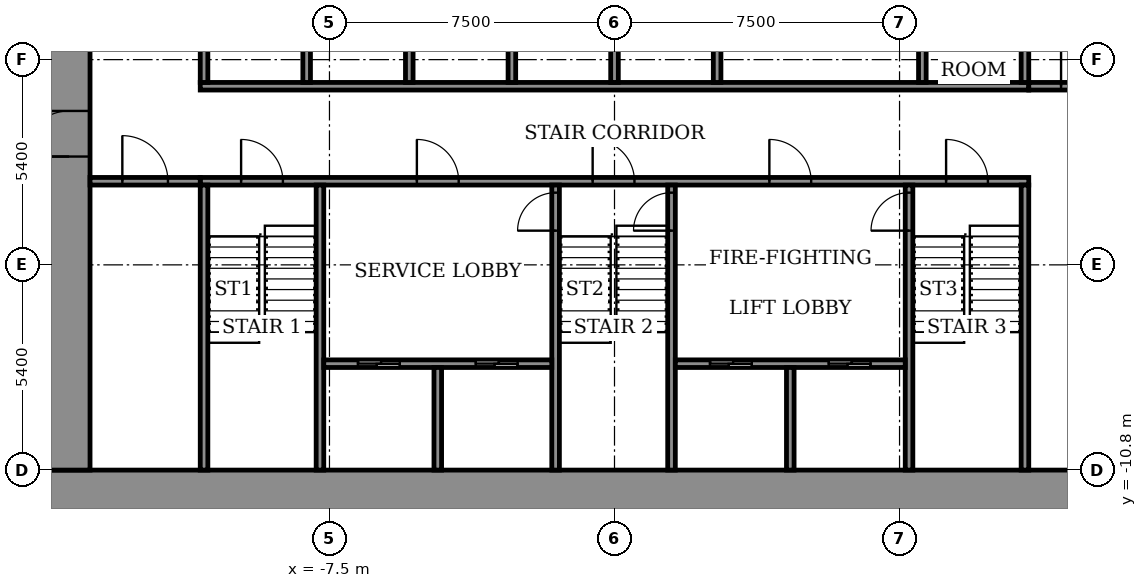
"""IFC4 building model, lengths in metres.
Left out: names, types, materials, properties, quantities, classifications, styles, units other than length and angle.
Written with IfcOpenShell. Run it as: python <this file> out.ifc"""

import sys

from ifc_helpers import new_model, si_unit, direction, frame, frame_2d, origin, place, context, subcontext, project, spatial, rectangle, extrude, element, fill, save


model = new_model("IFC4")
c1 = context("Model", 3, precision=1e-05, world=origin(), true_north=direction((0.0, 1.0)))
c2 = subcontext(c1, "Body", "Model", "MODEL_VIEW")
j1 = project(units=[si_unit("LENGTHUNIT", "METRE"), si_unit("PLANEANGLEUNIT", "RADIAN")], contexts=[c1])
p1 = place(None, origin())
s1 = spatial("IfcSite", under=j1, at=p1, CompositionType="ELEMENT")
p2 = place(p1, origin())
s2 = spatial("IfcBuilding", under=s1, at=p2, CompositionType="ELEMENT")
p3 = place(p2, frame((0.0, 0.0, 67.5)))
s3 = spatial("IfcBuildingStorey", under=s2, at=p3, CompositionType="ELEMENT", Elevation=67.5)
p4 = place(p3, frame((-14.9, -11.35, 0.0), z_axis=(0.0, 0.0, 1.0), x_axis=(1.0, 0.0, 0.0)))
e1 = element("IfcWall", 1, at=p4, inside=s3, PredefinedType="SHEAR", context=c2, shape_type="SweptSolid", body=[
    extrude(rectangle(XDim=29.8, YDim=1.1, at=frame_2d((14.9, 0.0))), origin(), (0.0, 0.0, 1.0), 3.6),
])
p5 = place(p3, frame((-14.35, -10.8, 0.0), z_axis=(0.0, 0.0, 1.0), x_axis=(0.0, 1.0, 0.0)))
e2 = element("IfcWall", 2, at=p5, inside=s3, PredefinedType="SHEAR", context=c2, shape_type="SweptSolid", body=[
    extrude(rectangle(XDim=21.6, YDim=1.1, at=frame_2d((10.8, 0.0))), origin(), (0.0, 0.0, 1.0), 3.6),
])
p6 = place(p5, frame((8.25, 0.0, 0.0)))
e3 = element("IfcOpeningElement", 3, at=p6, cuts=e2, PredefinedType="OPENING", context=c2, shape_type="SweptSolid", body=[
    extrude(rectangle(XDim=1.2, YDim=2.1, at=frame_2d((0.6, 1.05))), frame((0.0, 0.56, 0.0), z_axis=(0.0, -1.0, 0.0), x_axis=(1.0, 0.0, 0.0)), (0.0, 0.0, 1.0), 1.12),
])
p7 = place(p5, frame((15.25, 0.0, 0.0)))
e4 = element("IfcOpeningElement", 4, at=p7, cuts=e2, PredefinedType="OPENING", context=c2, shape_type="SweptSolid", body=[
    extrude(rectangle(XDim=1.2, YDim=2.1, at=frame_2d((0.6, 1.05))), frame((0.0, 0.56, 0.0), z_axis=(0.0, -1.0, 0.0), x_axis=(1.0, 0.0, 0.0)), (0.0, 0.0, 1.0), 1.12),
])
p8 = place(p3, frame((-10.9, -3.2, 0.0), z_axis=(0.0, 0.0, 1.0), x_axis=(1.0, 0.0, 0.0)))
e5 = element("IfcWall", 5, at=p8, inside=s3, PredefinedType="SHEAR", context=c2, shape_type="SweptSolid", body=[
    extrude(rectangle(XDim=21.8, YDim=0.2, at=frame_2d((10.9, 0.0))), origin(), (0.0, 0.0, 1.0), 3.05),
])
p9 = place(p8, frame((1.075, 0.0, 0.0)))
e6 = element("IfcOpeningElement", 6, at=p9, cuts=e5, PredefinedType="OPENING", context=c2, shape_type="SweptSolid", body=[
    extrude(rectangle(XDim=1.1, YDim=2.1, at=frame_2d((0.55, 1.05))), frame((0.0, 0.11, 0.0), z_axis=(0.0, -1.0, 0.0), x_axis=(1.0, 0.0, 0.0)), (0.0, 0.0, 1.0), 0.22),
])
p10 = place(p8, frame((10.325, 0.0, 0.0)))
e7 = element("IfcOpeningElement", 7, at=p10, cuts=e5, PredefinedType="OPENING", context=c2, shape_type="SweptSolid", body=[
    extrude(rectangle(XDim=1.1, YDim=2.1, at=frame_2d((0.55, 1.05))), frame((0.0, 0.11, 0.0), z_axis=(0.0, -1.0, 0.0), x_axis=(1.0, 0.0, 0.0)), (0.0, 0.0, 1.0), 0.22),
])
p11 = place(p8, frame((19.625, 0.0, 0.0)))
e8 = element("IfcOpeningElement", 8, at=p11, cuts=e5, PredefinedType="OPENING", context=c2, shape_type="SweptSolid", body=[
    extrude(rectangle(XDim=1.1, YDim=2.1, at=frame_2d((0.55, 1.05))), frame((0.0, 0.11, 0.0), z_axis=(0.0, -1.0, 0.0), x_axis=(1.0, 0.0, 0.0)), (0.0, 0.0, 1.0), 0.22),
])
p12 = place(p8, frame((5.7, 0.0, 0.0)))
e9 = element("IfcOpeningElement", 9, at=p12, cuts=e5, PredefinedType="OPENING", context=c2, shape_type="SweptSolid", body=[
    extrude(rectangle(XDim=1.1, YDim=2.1, at=frame_2d((0.55, 1.05))), frame((0.0, 0.11, 0.0), z_axis=(0.0, -1.0, 0.0), x_axis=(1.0, 0.0, 0.0)), (0.0, 0.0, 1.0), 0.22),
])
p13 = place(p8, frame((14.975, 0.0, 0.0)))
e10 = element("IfcOpeningElement", 10, at=p13, cuts=e5, PredefinedType="OPENING", context=c2, shape_type="SweptSolid", body=[
    extrude(rectangle(XDim=1.1, YDim=2.1, at=frame_2d((0.55, 1.05))), frame((0.0, 0.11, 0.0), z_axis=(0.0, -1.0, 0.0), x_axis=(1.0, 0.0, 0.0)), (0.0, 0.0, 1.0), 0.22),
])
p14 = place(p3, frame((-10.9, -0.7, 0.0), z_axis=(0.0, 0.0, 1.0), x_axis=(1.0, 0.0, 0.0)))
e11 = element("IfcWall", 11, at=p14, inside=s3, PredefinedType="SHEAR", context=c2, shape_type="SweptSolid", body=[
    extrude(rectangle(XDim=21.8, YDim=0.2, at=frame_2d((10.9, 0.0))), origin(), (0.0, 0.0, 1.0), 3.05),
])
for number, where, z_axis, x_axis in (
    (12, (-10.8, -10.8, 0.0), (0.0, 0.0, 1.0), (0.0, 1.0, 0.0)),
    (13, (-7.75, -10.8, 0.0), (0.0, 0.0, 1.0), (0.0, 1.0, 0.0)),
):
    element("IfcWall", number, at=place(p3, frame(where, z_axis=z_axis, x_axis=x_axis)), inside=s3, PredefinedType="SHEAR", context=c2, shape_type="SweptSolid", body=[
        extrude(rectangle(XDim=7.5, YDim=0.2, at=frame_2d((3.75, 0.0))), origin(), (0.0, 0.0, 1.0), 3.05),
    ])
p15 = place(p3, frame((-1.55, -10.8, 0.0), z_axis=(0.0, 0.0, 1.0), x_axis=(0.0, 1.0, 0.0)))
e14 = element("IfcWall", 14, at=p15, inside=s3, PredefinedType="SHEAR", context=c2, shape_type="SweptSolid", body=[
    extrude(rectangle(XDim=7.5, YDim=0.2, at=frame_2d((3.75, 0.0))), origin(), (0.0, 0.0, 1.0), 3.05),
])
p16 = place(p15, frame((6.3, 0.0, 0.0)))
e15 = element("IfcOpeningElement", 15, at=p16, cuts=e14, PredefinedType="OPENING", context=c2, shape_type="SweptSolid", body=[
    extrude(rectangle(XDim=1.0, YDim=2.1, at=frame_2d((0.5, 1.05))), frame((0.0, 0.11, 0.0), z_axis=(0.0, -1.0, 0.0), x_axis=(1.0, 0.0, 0.0)), (0.0, 0.0, 1.0), 0.22),
])
p17 = place(p3, frame((1.5, -10.8, 0.0), z_axis=(0.0, 0.0, 1.0), x_axis=(0.0, 1.0, 0.0)))
e16 = element("IfcWall", 16, at=p17, inside=s3, PredefinedType="SHEAR", context=c2, shape_type="SweptSolid", body=[
    extrude(rectangle(XDim=7.5, YDim=0.2, at=frame_2d((3.75, 0.0))), origin(), (0.0, 0.0, 1.0), 3.05),
])
p18 = place(p17, frame((6.3, 0.0, 0.0)))
e17 = element("IfcOpeningElement", 17, at=p18, cuts=e16, PredefinedType="OPENING", context=c2, shape_type="SweptSolid", body=[
    extrude(rectangle(XDim=1.0, YDim=2.1, at=frame_2d((0.5, 1.05))), frame((0.0, 0.11, 0.0), z_axis=(0.0, -1.0, 0.0), x_axis=(1.0, 0.0, 0.0)), (0.0, 0.0, 1.0), 0.22),
])
p19 = place(p3, frame((7.75, -10.8, 0.0), z_axis=(0.0, 0.0, 1.0), x_axis=(0.0, 1.0, 0.0)))
e18 = element("IfcWall", 18, at=p19, inside=s3, PredefinedType="SHEAR", context=c2, shape_type="SweptSolid", body=[
    extrude(rectangle(XDim=7.5, YDim=0.2, at=frame_2d((3.75, 0.0))), origin(), (0.0, 0.0, 1.0), 3.05),
])
p20 = place(p19, frame((6.3, 0.0, 0.0)))
e19 = element("IfcOpeningElement", 19, at=p20, cuts=e18, PredefinedType="OPENING", context=c2, shape_type="SweptSolid", body=[
    extrude(rectangle(XDim=1.0, YDim=2.1, at=frame_2d((0.5, 1.05))), frame((0.0, 0.11, 0.0), z_axis=(0.0, -1.0, 0.0), x_axis=(1.0, 0.0, 0.0)), (0.0, 0.0, 1.0), 0.22),
])
p21 = place(p3, frame((10.8, -10.8, 0.0), z_axis=(0.0, 0.0, 1.0), x_axis=(0.0, 1.0, 0.0)))
e20 = element("IfcWall", 20, at=p21, inside=s3, PredefinedType="SHEAR", context=c2, shape_type="SweptSolid", body=[
    extrude(rectangle(XDim=7.5, YDim=0.2, at=frame_2d((3.75, 0.0))), origin(), (0.0, 0.0, 1.0), 3.05),
])
p22 = place(p3, frame((-7.65, -8.0, 0.0), z_axis=(0.0, 0.0, 1.0), x_axis=(1.0, 0.0, 0.0)))
e21 = element("IfcWall", 21, at=p22, inside=s3, PredefinedType="SHEAR", context=c2, shape_type="SweptSolid", body=[
    extrude(rectangle(XDim=6.0, YDim=0.2, at=frame_2d((3.0, 0.0))), origin(), (0.0, 0.0, 1.0), 3.05),
])
p23 = place(p22, frame((0.9, 0.0, 0.0)))
e22 = element("IfcOpeningElement", 22, at=p23, cuts=e21, PredefinedType="OPENING", context=c2, shape_type="SweptSolid", body=[
    extrude(rectangle(XDim=1.1, YDim=2.1, at=frame_2d((0.55, 1.05))), frame((0.0, 0.11, 0.0), z_axis=(0.0, -1.0, 0.0), x_axis=(1.0, 0.0, 0.0)), (0.0, 0.0, 1.0), 0.22),
])
p24 = place(p22, frame((4.0, 0.0, 0.0)))
e23 = element("IfcOpeningElement", 23, at=p24, cuts=e21, PredefinedType="OPENING", context=c2, shape_type="SweptSolid", body=[
    extrude(rectangle(XDim=1.1, YDim=2.1, at=frame_2d((0.55, 1.05))), frame((0.0, 0.11, 0.0), z_axis=(0.0, -1.0, 0.0), x_axis=(1.0, 0.0, 0.0)), (0.0, 0.0, 1.0), 0.22),
])
p25 = place(p3, frame((-4.65, -10.8, 0.0), z_axis=(0.0, 0.0, 1.0), x_axis=(0.0, 1.0, 0.0)))
e24 = element("IfcWall", 24, at=p25, inside=s3, PredefinedType="SHEAR", context=c2, shape_type="SweptSolid", body=[
    extrude(rectangle(XDim=2.7, YDim=0.2, at=frame_2d((1.35, 0.0))), origin(), (0.0, 0.0, 1.0), 3.05),
])
p26 = place(p3, frame((1.6, -8.0, 0.0), z_axis=(0.0, 0.0, 1.0), x_axis=(1.0, 0.0, 0.0)))
e25 = element("IfcWall", 25, at=p26, inside=s3, PredefinedType="SHEAR", context=c2, shape_type="SweptSolid", body=[
    extrude(rectangle(XDim=6.05, YDim=0.2, at=frame_2d((3.025, 0.0))), origin(), (0.0, 0.0, 1.0), 3.05),
])
p27 = place(p26, frame((0.913, 0.0, 0.0)))
e26 = element("IfcOpeningElement", 26, at=p27, cuts=e25, PredefinedType="OPENING", context=c2, shape_type="SweptSolid", body=[
    extrude(rectangle(XDim=1.1, YDim=2.1, at=frame_2d((0.55, 1.05))), frame((0.0, 0.11, 0.0), z_axis=(0.0, -1.0, 0.0), x_axis=(1.0, 0.0, 0.0)), (0.0, 0.0, 1.0), 0.22),
])
p28 = place(p26, frame((4.038, 0.0, 0.0)))
e27 = element("IfcOpeningElement", 27, at=p28, cuts=e25, PredefinedType="OPENING", context=c2, shape_type="SweptSolid", body=[
    extrude(rectangle(XDim=1.1, YDim=2.1, at=frame_2d((0.55, 1.05))), frame((0.0, 0.11, 0.0), z_axis=(0.0, -1.0, 0.0), x_axis=(1.0, 0.0, 0.0)), (0.0, 0.0, 1.0), 0.22),
])
p29 = place(p3, frame((4.625, -10.8, 0.0), z_axis=(0.0, 0.0, 1.0), x_axis=(0.0, 1.0, 0.0)))
e28 = element("IfcWall", 28, at=p29, inside=s3, PredefinedType="SHEAR", context=c2, shape_type="SweptSolid", body=[
    extrude(rectangle(XDim=2.7, YDim=0.2, at=frame_2d((1.35, 0.0))), origin(), (0.0, 0.0, 1.0), 3.05),
])
for number, where, z_axis, x_axis in (
    (29, (-10.8, -0.6, 0.0), (0.0, 0.0, 1.0), (0.0, 1.0, 0.0)),
    (30, (-8.1, -0.6, 0.0), (0.0, 0.0, 1.0), (0.0, 1.0, 0.0)),
    (31, (-5.4, -0.6, 0.0), (0.0, 0.0, 1.0), (0.0, 1.0, 0.0)),
    (32, (-2.7, -0.6, 0.0), (0.0, 0.0, 1.0), (0.0, 1.0, 0.0)),
    (33, (0.0, -0.6, 0.0), (0.0, 0.0, 1.0), (0.0, 1.0, 0.0)),
    (34, (2.7, -0.6, 0.0), (0.0, 0.0, 1.0), (0.0, 1.0, 0.0)),
):
    element("IfcWall", number, at=place(p3, frame(where, z_axis=z_axis, x_axis=x_axis)), inside=s3, PredefinedType="SHEAR", context=c2, shape_type="SweptSolid", body=[
        extrude(rectangle(XDim=2.5, YDim=0.2, at=frame_2d((1.25, 0.0))), origin(), (0.0, 0.0, 1.0), 3.05),
    ])
for number, where, z_axis, x_axis in (
    (35, (8.1, -0.6, 0.0), (0.0, 0.0, 1.0), (0.0, 1.0, 0.0)),
    (36, (10.8, -0.6, 0.0), (0.0, 0.0, 1.0), (0.0, 1.0, 0.0)),
):
    element("IfcWall", number, at=place(p3, frame(where, z_axis=z_axis, x_axis=x_axis)), inside=s3, PredefinedType="STANDARD", context=c2, shape_type="SweptSolid", body=[
        extrude(rectangle(XDim=2.5, YDim=0.2, at=frame_2d((1.25, 0.0))), origin(), (0.0, 0.0, 1.0), 3.05),
    ])
p30 = place(p3, frame((-13.8, -3.2, 0.0), z_axis=(0.0, 0.0, 1.0), x_axis=(1.0, 0.0, 0.0)))
e37 = element("IfcWall", 37, at=p30, inside=s3, PredefinedType="STANDARD", context=c2, shape_type="SweptSolid", body=[
    extrude(rectangle(XDim=2.9, YDim=0.2, at=frame_2d((1.45, 0.0))), origin(), (0.0, 0.0, 1.0), 3.05),
])
p31 = place(p30, frame((0.85, 0.0, 0.0)))
e38 = element("IfcOpeningElement", 38, at=p31, cuts=e37, PredefinedType="OPENING", context=c2, shape_type="SweptSolid", body=[
    extrude(rectangle(XDim=1.2, YDim=2.1, at=frame_2d((0.6, 1.05))), frame((0.0, 0.11, 0.0), z_axis=(0.0, -1.0, 0.0), x_axis=(1.0, 0.0, 0.0)), (0.0, 0.0, 1.0), 0.22),
])
p32 = place(p3, frame((10.9, -0.7, 0.0), z_axis=(0.0, 0.0, 1.0), x_axis=(1.0, 0.0, 0.0)))
e39 = element("IfcWall", 39, at=p32, inside=s3, PredefinedType="STANDARD", context=c2, shape_type="SweptSolid", body=[
    extrude(rectangle(XDim=2.9, YDim=0.2, at=frame_2d((1.45, 0.0))), origin(), (0.0, 0.0, 1.0), 3.05),
])
p33 = place(p32, frame((0.85, 0.0, 0.0)))
e40 = element("IfcOpeningElement", 40, at=p33, cuts=e39, PredefinedType="OPENING", context=c2, shape_type="SweptSolid", body=[
    extrude(rectangle(XDim=1.2, YDim=2.1, at=frame_2d((0.6, 1.05))), frame((0.0, 0.11, 0.0), z_axis=(0.0, -1.0, 0.0), x_axis=(1.0, 0.0, 0.0)), (0.0, 0.0, 1.0), 0.22),
])
p34 = place(p6, origin())
e41 = element("IfcDoor", 41, at=p34, inside=s3, OperationType="DOUBLE_DOOR_SINGLE_SWING", PredefinedType="DOOR", context=c2, shape_type="SweptSolid", body=[
    extrude(rectangle(XDim=1.2, YDim=2.1, at=frame_2d((0.6, 1.05))), frame((0.0, 0.025, 0.0), z_axis=(0.0, -1.0, 0.0), x_axis=(1.0, 0.0, 0.0)), (0.0, 0.0, 1.0), 0.05),
])
fill(e3, e41)
p35 = place(p27, origin())
e42 = element("IfcDoor", 42, at=p35, inside=s3, OperationType="SLIDING_TO_LEFT", PredefinedType="DOOR", context=c2, shape_type="SweptSolid", body=[
    extrude(rectangle(XDim=1.1, YDim=2.1, at=frame_2d((0.55, 1.05))), frame((0.0, 0.025, 0.0), z_axis=(0.0, -1.0, 0.0), x_axis=(1.0, 0.0, 0.0)), (0.0, 0.0, 1.0), 0.05),
])
fill(e26, e42)
p36 = place(p23, origin())
e43 = element("IfcDoor", 43, at=p36, inside=s3, OperationType="SLIDING_TO_LEFT", PredefinedType="DOOR", context=c2, shape_type="SweptSolid", body=[
    extrude(rectangle(XDim=1.1, YDim=2.1, at=frame_2d((0.55, 1.05))), frame((0.0, 0.025, 0.0), z_axis=(0.0, -1.0, 0.0), x_axis=(1.0, 0.0, 0.0)), (0.0, 0.0, 1.0), 0.05),
])
fill(e22, e43)
p37 = place(p28, origin())
e44 = element("IfcDoor", 44, at=p37, inside=s3, OperationType="SLIDING_TO_LEFT", PredefinedType="DOOR", context=c2, shape_type="SweptSolid", body=[
    extrude(rectangle(XDim=1.1, YDim=2.1, at=frame_2d((0.55, 1.05))), frame((0.0, 0.025, 0.0), z_axis=(0.0, -1.0, 0.0), x_axis=(1.0, 0.0, 0.0)), (0.0, 0.0, 1.0), 0.05),
])
fill(e27, e44)
p38 = place(p24, origin())
e45 = element("IfcDoor", 45, at=p38, inside=s3, OperationType="SLIDING_TO_LEFT", PredefinedType="DOOR", context=c2, shape_type="SweptSolid", body=[
    extrude(rectangle(XDim=1.1, YDim=2.1, at=frame_2d((0.55, 1.05))), frame((0.0, 0.025, 0.0), z_axis=(0.0, -1.0, 0.0), x_axis=(1.0, 0.0, 0.0)), (0.0, 0.0, 1.0), 0.05),
])
fill(e23, e45)
p39 = place(p9, origin())
e46 = element("IfcDoor", 46, at=p39, inside=s3, OperationType="SINGLE_SWING_RIGHT", PredefinedType="DOOR", context=c2, shape_type="SweptSolid", body=[
    extrude(rectangle(XDim=1.1, YDim=2.1, at=frame_2d((0.55, 1.05))), frame((0.0, 0.025, 0.0), z_axis=(0.0, -1.0, 0.0), x_axis=(1.0, 0.0, 0.0)), (0.0, 0.0, 1.0), 0.05),
])
fill(e6, e46)
p40 = place(p10, origin())
e47 = element("IfcDoor", 47, at=p40, inside=s3, OperationType="SINGLE_SWING_RIGHT", PredefinedType="DOOR", context=c2, shape_type="SweptSolid", body=[
    extrude(rectangle(XDim=1.1, YDim=2.1, at=frame_2d((0.55, 1.05))), frame((0.0, 0.025, 0.0), z_axis=(0.0, -1.0, 0.0), x_axis=(1.0, 0.0, 0.0)), (0.0, 0.0, 1.0), 0.05),
])
fill(e7, e47)
p41 = place(p11, origin())
e48 = element("IfcDoor", 48, at=p41, inside=s3, OperationType="SINGLE_SWING_RIGHT", PredefinedType="DOOR", context=c2, shape_type="SweptSolid", body=[
    extrude(rectangle(XDim=1.1, YDim=2.1, at=frame_2d((0.55, 1.05))), frame((0.0, 0.025, 0.0), z_axis=(0.0, -1.0, 0.0), x_axis=(1.0, 0.0, 0.0)), (0.0, 0.0, 1.0), 0.05),
])
fill(e8, e48)
p42 = place(p12, origin())
e49 = element("IfcDoor", 49, at=p42, inside=s3, OperationType="SINGLE_SWING_LEFT", PredefinedType="DOOR", context=c2, shape_type="SweptSolid", body=[
    extrude(rectangle(XDim=1.1, YDim=2.1, at=frame_2d((0.55, 1.05))), frame((0.0, 0.025, 0.0), z_axis=(0.0, -1.0, 0.0), x_axis=(1.0, 0.0, 0.0)), (0.0, 0.0, 1.0), 0.05),
])
fill(e9, e49)
p43 = place(p13, origin())
e50 = element("IfcDoor", 50, at=p43, inside=s3, OperationType="SINGLE_SWING_LEFT", PredefinedType="DOOR", context=c2, shape_type="SweptSolid", body=[
    extrude(rectangle(XDim=1.1, YDim=2.1, at=frame_2d((0.55, 1.05))), frame((0.0, 0.025, 0.0), z_axis=(0.0, -1.0, 0.0), x_axis=(1.0, 0.0, 0.0)), (0.0, 0.0, 1.0), 0.05),
])
fill(e10, e50)
p44 = place(p16, origin())
e51 = element("IfcDoor", 51, at=p44, inside=s3, OperationType="SINGLE_SWING_RIGHT", PredefinedType="DOOR", context=c2, shape_type="SweptSolid", body=[
    extrude(rectangle(XDim=1.0, YDim=2.1, at=frame_2d((0.5, 1.05))), frame((0.0, 0.025, 0.0), z_axis=(0.0, -1.0, 0.0), x_axis=(1.0, 0.0, 0.0)), (0.0, 0.0, 1.0), 0.05),
])
fill(e15, e51)
p45 = place(p18, origin())
e52 = element("IfcDoor", 52, at=p45, inside=s3, OperationType="SINGLE_SWING_RIGHT", PredefinedType="DOOR", context=c2, shape_type="SweptSolid", body=[
    extrude(rectangle(XDim=1.0, YDim=2.1, at=frame_2d((0.5, 1.05))), frame((0.0, 0.025, 0.0), z_axis=(0.0, -1.0, 0.0), x_axis=(1.0, 0.0, 0.0)), (0.0, 0.0, 1.0), 0.05),
])
fill(e17, e52)
p46 = place(p20, origin())
e53 = element("IfcDoor", 53, at=p46, inside=s3, OperationType="SINGLE_SWING_RIGHT", PredefinedType="DOOR", context=c2, shape_type="SweptSolid", body=[
    extrude(rectangle(XDim=1.0, YDim=2.1, at=frame_2d((0.5, 1.05))), frame((0.0, 0.025, 0.0), z_axis=(0.0, -1.0, 0.0), x_axis=(1.0, 0.0, 0.0)), (0.0, 0.0, 1.0), 0.05),
])
fill(e19, e53)
p47 = place(p31, origin())
e54 = element("IfcDoor", 54, at=p47, inside=s3, OperationType="SINGLE_SWING_LEFT", PredefinedType="DOOR", context=c2, shape_type="SweptSolid", body=[
    extrude(rectangle(XDim=1.2, YDim=2.1, at=frame_2d((0.6, 1.05))), frame((0.0, 0.025, 0.0), z_axis=(0.0, -1.0, 0.0), x_axis=(1.0, 0.0, 0.0)), (0.0, 0.0, 1.0), 0.05),
])
fill(e38, e54)
p48 = place(p33, origin())
e55 = element("IfcDoor", 55, at=p48, inside=s3, OperationType="SINGLE_SWING_LEFT", PredefinedType="DOOR", context=c2, shape_type="SweptSolid", body=[
    extrude(rectangle(XDim=1.2, YDim=2.1, at=frame_2d((0.6, 1.05))), frame((0.0, 0.025, 0.0), z_axis=(0.0, -1.0, 0.0), x_axis=(1.0, 0.0, 0.0)), (0.0, 0.0, 1.0), 0.05),
])
fill(e40, e55)
save(model, sys.argv[1])
